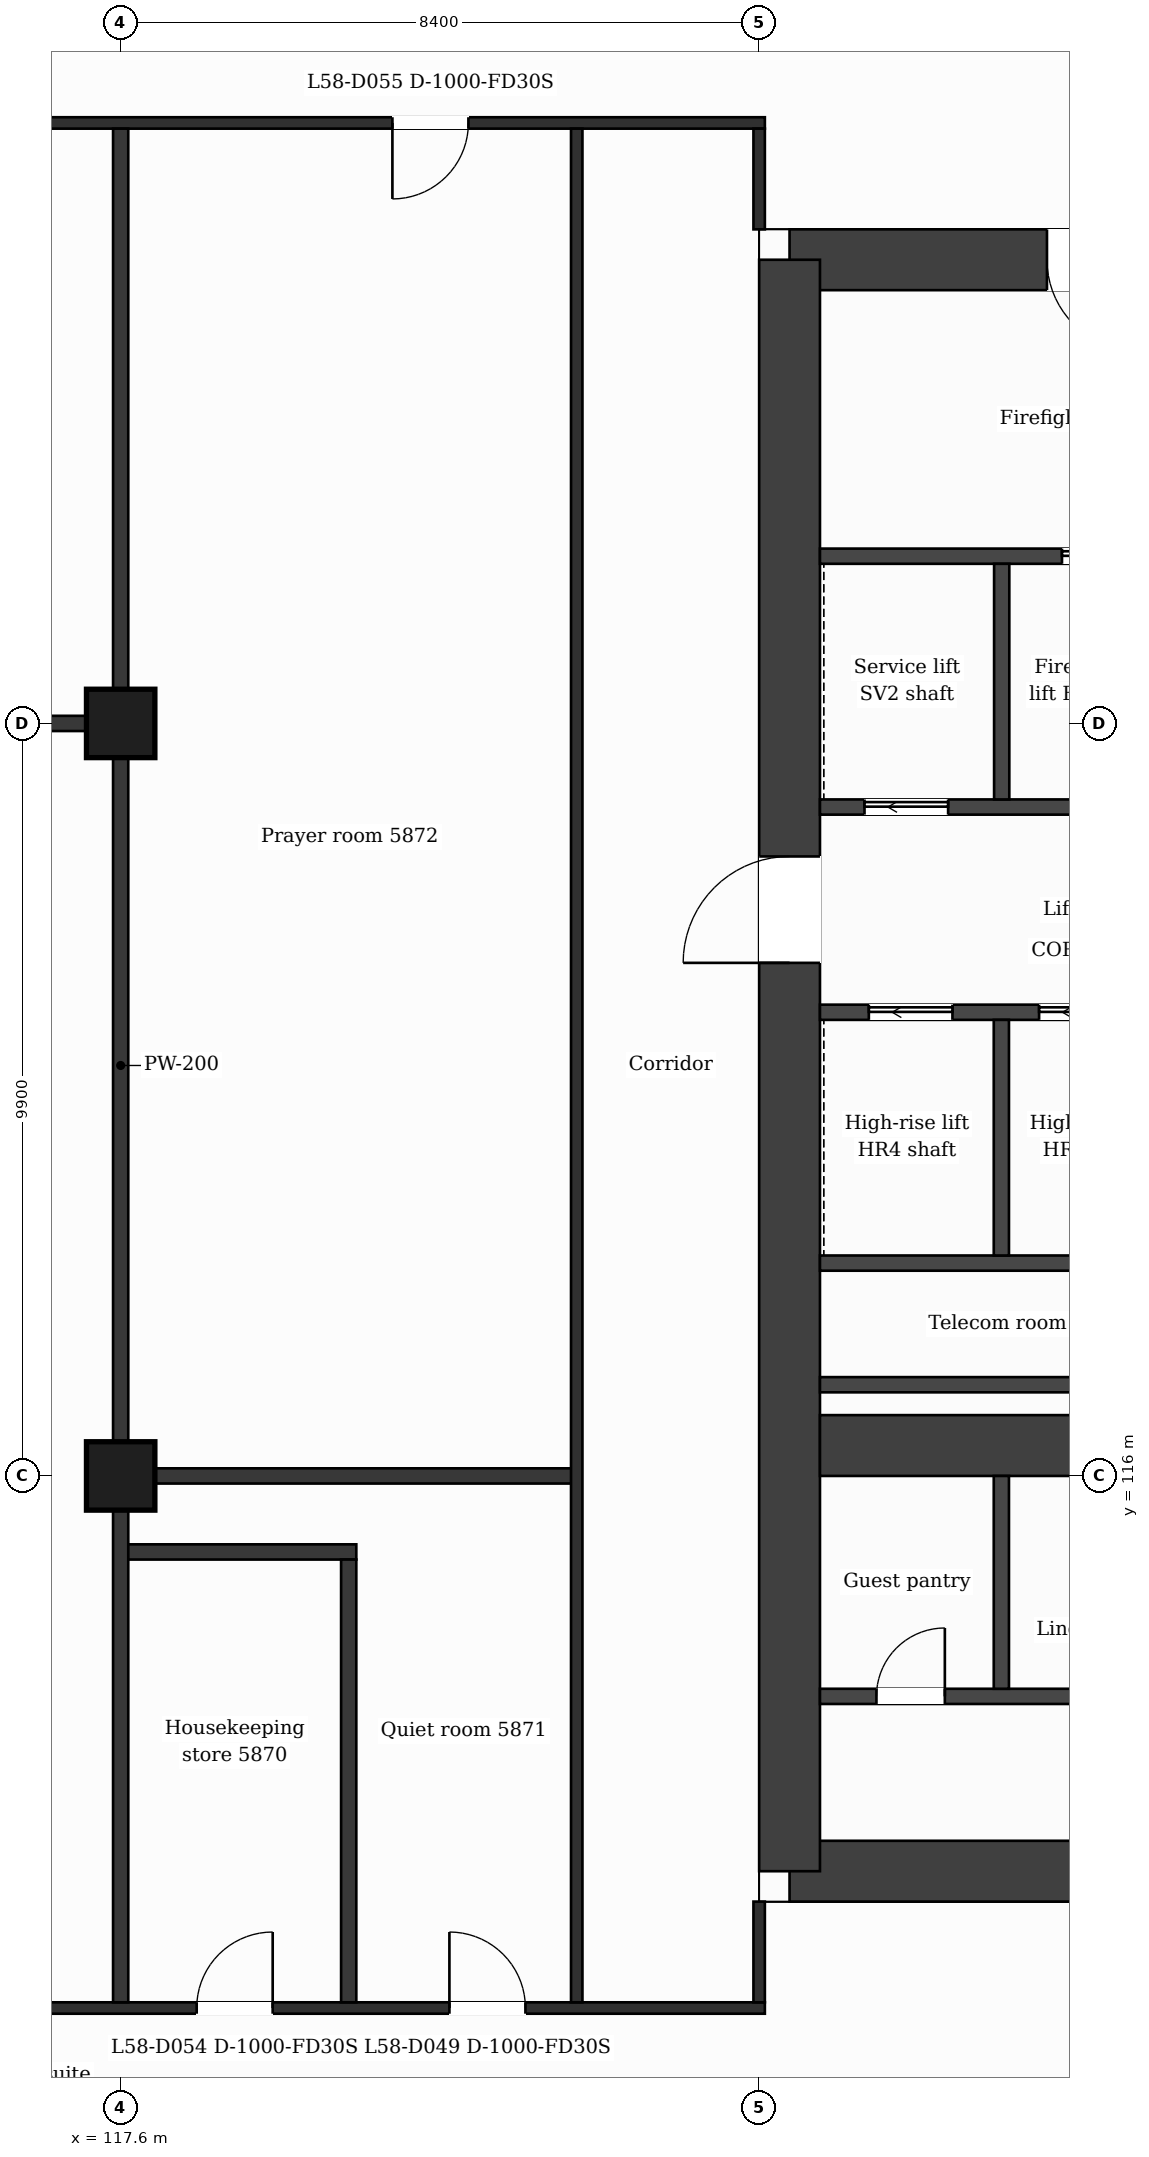
"""IFC4 building model, lengths in metres.
Left out: names, types, materials, properties, quantities, classifications, styles, units other than length and angle.
Written with IfcOpenShell. Run it as: python <this file> out.ifc"""

import sys

from ifc_helpers import new_model, si_unit, direction, frame, frame_2d, origin, origin_2d, place, context, subcontext, project, spatial, rectangle, extrude, element, fill, save


model = new_model("IFC4")
c1 = context("Model", 3, precision=1e-05, world=origin(), true_north=direction((0.0, 1.0)))
c2 = subcontext(c1, "Body", "Model", "MODEL_VIEW")
j1 = project(units=[si_unit("LENGTHUNIT", "METRE"), si_unit("PLANEANGLEUNIT", "RADIAN")], contexts=[c1])
p1 = place(None, origin())
s1 = spatial("IfcSite", under=j1, at=p1, CompositionType="ELEMENT")
p2 = place(p1, origin())
s2 = spatial("IfcBuilding", under=s1, at=p2, CompositionType="ELEMENT")
p3 = place(p2, frame((0.0, 0.0, 239.2)))
s3 = spatial("IfcBuildingStorey", under=s2, at=p3, CompositionType="ELEMENT", Elevation=239.2)
p4 = place(p3, frame((126.4, 132.0, 0.0), z_axis=(0.0, 0.0, 1.0), x_axis=(1.0, 0.0, 0.0)))
e1 = element("IfcWall", 1, at=p4, inside=s3, PredefinedType="SHEAR", context=c2, shape_type="SweptSolid", body=[
    extrude(rectangle(XDim=11.42, YDim=0.8, at=frame_2d((5.71, 0.0))), origin(), (0.0, 0.0, 1.0), 3.7),
])
p5 = place(p4, frame((3.386, 0.0, 0.0)))
e2 = element("IfcOpeningElement", 2, at=p5, cuts=e1, PredefinedType="OPENING", context=c2, shape_type="SweptSolid", body=[
    extrude(rectangle(XDim=1.2, YDim=2.1, at=frame_2d((0.6, 1.05))), frame((0.0, 0.41, 0.0), z_axis=(0.0, -1.0, 0.0), x_axis=(1.0, 0.0, 0.0)), (0.0, 0.0, 1.0), 0.82),
])
p6 = place(p3, frame((140.673, 110.8, 0.0), z_axis=(0.0, 0.0, 1.0), x_axis=(-1.0, 0.0, 0.0)))
e3 = element("IfcWall", 3, at=p6, inside=s3, PredefinedType="SHEAR", context=c2, shape_type="SweptSolid", body=[
    extrude(rectangle(XDim=14.273, YDim=0.8, at=frame_2d((7.137, 0.0))), origin(), (0.0, 0.0, 1.0), 3.7),
])
p7 = place(p6, frame((6.965, 0.0, 0.0)))
e4 = element("IfcOpeningElement", 4, at=p7, cuts=e3, PredefinedType="OPENING", context=c2, shape_type="SweptSolid", body=[
    extrude(rectangle(XDim=1.4, YDim=2.1, at=frame_2d((0.7, 1.05))), frame((0.0, 0.41, 0.0), z_axis=(0.0, -1.0, 0.0), x_axis=(1.0, 0.0, 0.0)), (0.0, 0.0, 1.0), 0.82),
])
p8 = place(p3, frame((126.4, 110.8, 0.0), z_axis=(0.0, 0.0, 1.0), x_axis=(0.0, 1.0, 0.0)))
e5 = element("IfcWall", 5, at=p8, inside=s3, PredefinedType="SHEAR", context=c2, shape_type="SweptSolid", body=[
    extrude(rectangle(XDim=21.2, YDim=0.8, at=frame_2d((10.6, 0.0))), origin(), (0.0, 0.0, 1.0), 3.7),
])
p9 = place(p8, frame((11.95, 0.0, 0.0)))
e6 = element("IfcOpeningElement", 6, at=p9, cuts=e5, PredefinedType="OPENING", context=c2, shape_type="SweptSolid", body=[
    extrude(rectangle(XDim=1.4, YDim=2.1, at=frame_2d((0.7, 1.05))), frame((0.0, 0.41, 0.0), z_axis=(0.0, -1.0, 0.0), x_axis=(1.0, 0.0, 0.0)), (0.0, 0.0, 1.0), 0.82),
])
p10 = place(p3, frame((126.8, 116.4, 0.0), z_axis=(0.0, 0.0, 1.0), x_axis=(1.0, 0.0, 0.0)))
e7 = element("IfcWall", 7, at=p10, inside=s3, PredefinedType="SHEAR", context=c2, shape_type="SweptSolid", body=[
    extrude(rectangle(XDim=5.3, YDim=0.8, at=frame_2d((2.65, 0.0))), origin(), (0.0, 0.0, 1.0), 3.7),
])
for number, where, z_axis, x_axis in (
    (8, (117.6, 116.0, 0.0), (0.0, 0.0, 1.0), (1.0, 0.0, 0.0)),
    (9, (117.6, 125.9, 0.0), (0.0, 0.0, 1.0), (1.0, 0.0, 0.0)),
):
    element("IfcColumn", number, at=place(p3, frame(where, z_axis=z_axis, x_axis=x_axis)), inside=s3, PredefinedType="COLUMN", context=c2, shape_type="SweptSolid", body=[
        extrude(rectangle(XDim=0.9, YDim=0.9, at=origin_2d()), origin(), (0.0, 0.0, 1.0), 3.7),
    ])
p11 = place(p3, frame((100.725, 109.0, 0.0), z_axis=(0.0, 0.0, 1.0), x_axis=(1.0, 0.0, 0.0)))
e10 = element("IfcWall", 10, at=p11, inside=s3, PredefinedType="PARTITIONING", context=c2, shape_type="SweptSolid", body=[
    extrude(rectangle(XDim=25.35, YDim=0.15, at=frame_2d((12.675, 0.0))), origin(), (0.0, 0.0, 1.0), 3.38),
])
p12 = place(p11, frame((21.2, 0.0, 0.0)))
e11 = element("IfcOpeningElement", 11, at=p12, cuts=e10, PredefinedType="OPENING", context=c2, shape_type="SweptSolid", body=[
    extrude(rectangle(XDim=1.0, YDim=2.1, at=frame_2d((0.5, 1.05))), frame((0.0, 0.085, 0.0), z_axis=(0.0, -1.0, 0.0), x_axis=(1.0, 0.0, 0.0)), (0.0, 0.0, 1.0), 0.17),
])
p13 = place(p11, frame((3.9, 0.0, 0.0)))
e12 = element("IfcOpeningElement", 12, at=p13, cuts=e10, PredefinedType="OPENING", context=c2, shape_type="SweptSolid", body=[
    extrude(rectangle(XDim=1.0, YDim=2.1, at=frame_2d((0.5, 1.05))), frame((0.0, 0.085, 0.0), z_axis=(0.0, -1.0, 0.0), x_axis=(1.0, 0.0, 0.0)), (0.0, 0.0, 1.0), 0.17),
])
p14 = place(p11, frame((10.5, 0.0, 0.0)))
e13 = element("IfcOpeningElement", 13, at=p14, cuts=e10, PredefinedType="OPENING", context=c2, shape_type="SweptSolid", body=[
    extrude(rectangle(XDim=1.0, YDim=2.1, at=frame_2d((0.5, 1.05))), frame((0.0, 0.085, 0.0), z_axis=(0.0, -1.0, 0.0), x_axis=(1.0, 0.0, 0.0)), (0.0, 0.0, 1.0), 0.17),
])
p15 = place(p11, frame((17.875, 0.0, 0.0)))
e14 = element("IfcOpeningElement", 14, at=p15, cuts=e10, PredefinedType="OPENING", context=c2, shape_type="SweptSolid", body=[
    extrude(rectangle(XDim=1.0, YDim=2.1, at=frame_2d((0.5, 1.05))), frame((0.0, 0.085, 0.0), z_axis=(0.0, -1.0, 0.0), x_axis=(1.0, 0.0, 0.0)), (0.0, 0.0, 1.0), 0.17),
])
p16 = place(p3, frame((126.8, 113.1, 0.0), z_axis=(0.0, 0.0, 1.0), x_axis=(1.0, 0.0, 0.0)))
e15 = element("IfcWall", 15, at=p16, inside=s3, PredefinedType="PARTITIONING", context=c2, shape_type="SweptSolid", body=[
    extrude(rectangle(XDim=4.873, YDim=0.2, at=frame_2d((2.437, 0.0))), origin(), (0.0, 0.0, 1.0), 3.38),
])
p17 = place(p16, frame((0.743, 0.0, 0.0)))
e16 = element("IfcOpeningElement", 16, at=p17, cuts=e15, PredefinedType="OPENING", context=c2, shape_type="SweptSolid", body=[
    extrude(rectangle(XDim=0.9, YDim=2.1, at=frame_2d((0.45, 1.05))), frame((0.0, 0.11, 0.0), z_axis=(0.0, -1.0, 0.0), x_axis=(1.0, 0.0, 0.0)), (0.0, 0.0, 1.0), 0.22),
])
p18 = place(p3, frame((117.6, 115.0, 0.0), z_axis=(0.0, 0.0, 1.0), x_axis=(1.0, 0.0, 0.0)))
e17 = element("IfcWall", 17, at=p18, inside=s3, PredefinedType="PARTITIONING", context=c2, shape_type="SweptSolid", body=[
    extrude(rectangle(XDim=3.1, YDim=0.2, at=frame_2d((1.55, 0.0))), origin(), (0.0, 0.0, 1.0), 3.38),
])
p19 = place(p3, frame((117.6, 116.0, 0.0), z_axis=(0.0, 0.0, 1.0), x_axis=(1.0, 0.0, 0.0)))
e18 = element("IfcWall", 18, at=p19, inside=s3, PredefinedType="PARTITIONING", context=c2, shape_type="SweptSolid", body=[
    extrude(rectangle(XDim=6.0, YDim=0.2, at=frame_2d((3.0, 0.0))), origin(), (0.0, 0.0, 1.0), 3.38),
])
for number, where, z_axis, x_axis in (
    (19, (126.8, 117.2, 0.0), (0.0, 0.0, 1.0), (1.0, 0.0, 0.0)),
    (20, (126.8, 118.8, 0.0), (0.0, 0.0, 1.0), (1.0, 0.0, 0.0)),
):
    element("IfcWall", number, at=place(p3, frame(where, z_axis=z_axis, x_axis=x_axis)), inside=s3, PredefinedType="PARTITIONING", context=c2, shape_type="SweptSolid", body=[
        extrude(rectangle(XDim=4.773, YDim=0.2, at=frame_2d((2.386, 0.0))), origin(), (0.0, 0.0, 1.0), 3.38),
    ])
p20 = place(p3, frame((126.8, 122.1, 0.0), z_axis=(0.0, 0.0, 1.0), x_axis=(1.0, 0.0, 0.0)))
e21 = element("IfcWall", 21, at=p20, inside=s3, PredefinedType="PARTITIONING", context=c2, shape_type="SweptSolid", body=[
    extrude(rectangle(XDim=4.773, YDim=0.2, at=frame_2d((2.386, 0.0))), origin(), (0.0, 0.0, 1.0), 3.38),
])
p21 = place(p20, frame((2.883, 0.0, 0.0)))
e22 = element("IfcOpeningElement", 22, at=p21, cuts=e21, PredefinedType="OPENING", context=c2, shape_type="SweptSolid", body=[
    extrude(rectangle(XDim=1.1, YDim=2.1, at=frame_2d((0.55, 1.05))), frame((0.0, 0.11, 0.0), z_axis=(0.0, -1.0, 0.0), x_axis=(1.0, 0.0, 0.0)), (0.0, 0.0, 1.0), 0.22),
])
p22 = place(p20, frame((0.643, 0.0, 0.0)))
e23 = element("IfcOpeningElement", 23, at=p22, cuts=e21, PredefinedType="OPENING", context=c2, shape_type="SweptSolid", body=[
    extrude(rectangle(XDim=1.1, YDim=2.1, at=frame_2d((0.55, 1.05))), frame((0.0, 0.11, 0.0), z_axis=(0.0, -1.0, 0.0), x_axis=(1.0, 0.0, 0.0)), (0.0, 0.0, 1.0), 0.22),
])
p23 = place(p3, frame((126.8, 124.8, 0.0), z_axis=(0.0, 0.0, 1.0), x_axis=(1.0, 0.0, 0.0)))
e24 = element("IfcWall", 24, at=p23, inside=s3, PredefinedType="PARTITIONING", context=c2, shape_type="SweptSolid", body=[
    extrude(rectangle(XDim=4.782, YDim=0.2, at=frame_2d((2.391, 0.0))), origin(), (0.0, 0.0, 1.0), 3.38),
])
p24 = place(p23, frame((0.586, 0.0, 0.0)))
e25 = element("IfcOpeningElement", 25, at=p24, cuts=e24, PredefinedType="OPENING", context=c2, shape_type="SweptSolid", body=[
    extrude(rectangle(XDim=1.1, YDim=2.1, at=frame_2d((0.55, 1.05))), frame((0.0, 0.11, 0.0), z_axis=(0.0, -1.0, 0.0), x_axis=(1.0, 0.0, 0.0)), (0.0, 0.0, 1.0), 0.22),
])
p25 = place(p3, frame((103.2, 125.9, 0.0), z_axis=(0.0, 0.0, 1.0), x_axis=(1.0, 0.0, 0.0)))
e26 = element("IfcWall", 26, at=p25, inside=s3, PredefinedType="PARTITIONING", context=c2, shape_type="SweptSolid", body=[
    extrude(rectangle(XDim=14.4, YDim=0.2, at=frame_2d((7.2, 0.0))), origin(), (0.0, 0.0, 1.0), 3.38),
])
p26 = place(p3, frame((126.8, 128.1, 0.0), z_axis=(0.0, 0.0, 1.0), x_axis=(1.0, 0.0, 0.0)))
e27 = element("IfcWall", 27, at=p26, inside=s3, PredefinedType="PARTITIONING", context=c2, shape_type="SweptSolid", body=[
    extrude(rectangle(XDim=4.782, YDim=0.2, at=frame_2d((2.391, 0.0))), origin(), (0.0, 0.0, 1.0), 3.38),
])
p27 = place(p26, frame((3.184, 0.0, 0.0)))
e28 = element("IfcOpeningElement", 28, at=p27, cuts=e27, PredefinedType="OPENING", context=c2, shape_type="SweptSolid", body=[
    extrude(rectangle(XDim=1.1, YDim=2.1, at=frame_2d((0.55, 1.05))), frame((0.0, 0.11, 0.0), z_axis=(0.0, -1.0, 0.0), x_axis=(1.0, 0.0, 0.0)), (0.0, 0.0, 1.0), 0.22),
])
p28 = place(p3, frame((100.725, 133.8, 0.0), z_axis=(0.0, 0.0, 1.0), x_axis=(1.0, 0.0, 0.0)))
e29 = element("IfcWall", 29, at=p28, inside=s3, PredefinedType="PARTITIONING", context=c2, shape_type="SweptSolid", body=[
    extrude(rectangle(XDim=25.35, YDim=0.15, at=frame_2d((12.675, 0.0))), origin(), (0.0, 0.0, 1.0), 3.38),
])
p29 = place(p28, frame((4.975, 0.0, 0.0)))
e30 = element("IfcOpeningElement", 30, at=p29, cuts=e29, PredefinedType="OPENING", context=c2, shape_type="SweptSolid", body=[
    extrude(rectangle(XDim=1.0, YDim=2.1, at=frame_2d((0.5, 1.05))), frame((0.0, 0.085, 0.0), z_axis=(0.0, -1.0, 0.0), x_axis=(1.0, 0.0, 0.0)), (0.0, 0.0, 1.0), 0.17),
])
p30 = place(p28, frame((12.175, 0.0, 0.0)))
e31 = element("IfcOpeningElement", 31, at=p30, cuts=e29, PredefinedType="OPENING", context=c2, shape_type="SweptSolid", body=[
    extrude(rectangle(XDim=1.0, YDim=2.1, at=frame_2d((0.5, 1.05))), frame((0.0, 0.085, 0.0), z_axis=(0.0, -1.0, 0.0), x_axis=(1.0, 0.0, 0.0)), (0.0, 0.0, 1.0), 0.17),
])
p31 = place(p28, frame((20.45, 0.0, 0.0)))
e32 = element("IfcOpeningElement", 32, at=p31, cuts=e29, PredefinedType="OPENING", context=c2, shape_type="SweptSolid", body=[
    extrude(rectangle(XDim=1.0, YDim=2.1, at=frame_2d((0.5, 1.05))), frame((0.0, 0.085, 0.0), z_axis=(0.0, -1.0, 0.0), x_axis=(1.0, 0.0, 0.0)), (0.0, 0.0, 1.0), 0.17),
])
p32 = place(p3, frame((117.6, 109.075, 0.0), z_axis=(0.0, 0.0, 1.0), x_axis=(0.0, 1.0, 0.0)))
e33 = element("IfcWall", 33, at=p32, inside=s3, PredefinedType="PARTITIONING", context=c2, shape_type="SweptSolid", body=[
    extrude(rectangle(XDim=24.65, YDim=0.2, at=frame_2d((12.325, 0.0))), origin(), (0.0, 0.0, 1.0), 3.38),
])
p33 = place(p3, frame((120.6, 109.075, 0.0), z_axis=(0.0, 0.0, 1.0), x_axis=(0.0, 1.0, 0.0)))
e34 = element("IfcWall", 34, at=p33, inside=s3, PredefinedType="PARTITIONING", context=c2, shape_type="SweptSolid", body=[
    extrude(rectangle(XDim=5.825, YDim=0.2, at=frame_2d((2.913, 0.0))), origin(), (0.0, 0.0, 1.0), 3.38),
])
p34 = place(p3, frame((123.6, 109.075, 0.0), z_axis=(0.0, 0.0, 1.0), x_axis=(0.0, 1.0, 0.0)))
e35 = element("IfcWall", 35, at=p34, inside=s3, PredefinedType="PARTITIONING", context=c2, shape_type="SweptSolid", body=[
    extrude(rectangle(XDim=24.65, YDim=0.15, at=frame_2d((12.325, 0.0))), origin(), (0.0, 0.0, 1.0), 3.38),
])
p35 = place(p3, frame((126.0, 109.075, 0.0), z_axis=(0.0, 0.0, 1.0), x_axis=(0.0, 1.0, 0.0)))
e36 = element("IfcWall", 36, at=p35, inside=s3, PredefinedType="PARTITIONING", context=c2, shape_type="SweptSolid", body=[
    extrude(rectangle(XDim=1.325, YDim=0.15, at=frame_2d((0.663, 0.0))), origin(), (0.0, 0.0, 1.0), 3.38),
])
p36 = place(p3, frame((126.0, 132.4, 0.0), z_axis=(0.0, 0.0, 1.0), x_axis=(0.0, 1.0, 0.0)))
e37 = element("IfcWall", 37, at=p36, inside=s3, PredefinedType="PARTITIONING", context=c2, shape_type="SweptSolid", body=[
    extrude(rectangle(XDim=1.325, YDim=0.15, at=frame_2d((0.663, 0.0))), origin(), (0.0, 0.0, 1.0), 3.38),
])
p37 = place(p3, frame((129.187, 113.2, 0.0), z_axis=(0.0, 0.0, 1.0), x_axis=(0.0, 1.0, 0.0)))
e38 = element("IfcWall", 38, at=p37, inside=s3, PredefinedType="PARTITIONING", context=c2, shape_type="SweptSolid", body=[
    extrude(rectangle(XDim=2.8, YDim=0.2, at=frame_2d((1.4, 0.0))), origin(), (0.0, 0.0, 1.0), 3.38),
])
for number, where, z_axis, x_axis in (
    (39, (129.187, 118.9, 0.0), (0.0, 0.0, 1.0), (0.0, 1.0, 0.0)),
    (40, (129.191, 124.9, 0.0), (0.0, 0.0, 1.0), (0.0, 1.0, 0.0)),
):
    element("IfcWall", number, at=place(p3, frame(where, z_axis=z_axis, x_axis=x_axis)), inside=s3, PredefinedType="PARTITIONING", context=c2, shape_type="SweptSolid", body=[
        extrude(rectangle(XDim=3.1, YDim=0.2, at=frame_2d((1.55, 0.0))), origin(), (0.0, 0.0, 1.0), 3.38),
    ])
p38 = place(p21, origin())
e41 = element("IfcDoor", 41, at=p38, inside=s3, OperationType="SLIDING_TO_LEFT", PredefinedType="DOOR", context=c2, shape_type="SweptSolid", body=[
    extrude(rectangle(XDim=1.1, YDim=2.1, at=frame_2d((0.55, 1.05))), frame((0.0, 0.025, 0.0), z_axis=(0.0, -1.0, 0.0), x_axis=(1.0, 0.0, 0.0)), (0.0, 0.0, 1.0), 0.05),
])
fill(e22, e41)
p39 = place(p22, origin())
e42 = element("IfcDoor", 42, at=p39, inside=s3, OperationType="SLIDING_TO_LEFT", PredefinedType="DOOR", context=c2, shape_type="SweptSolid", body=[
    extrude(rectangle(XDim=1.1, YDim=2.1, at=frame_2d((0.55, 1.05))), frame((0.0, 0.025, 0.0), z_axis=(0.0, -1.0, 0.0), x_axis=(1.0, 0.0, 0.0)), (0.0, 0.0, 1.0), 0.05),
])
fill(e23, e42)
p40 = place(p27, origin())
e43 = element("IfcDoor", 43, at=p40, inside=s3, OperationType="SLIDING_TO_LEFT", PredefinedType="DOOR", context=c2, shape_type="SweptSolid", body=[
    extrude(rectangle(XDim=1.1, YDim=2.1, at=frame_2d((0.55, 1.05))), frame((0.0, 0.025, 0.0), z_axis=(0.0, -1.0, 0.0), x_axis=(1.0, 0.0, 0.0)), (0.0, 0.0, 1.0), 0.05),
])
fill(e28, e43)
p41 = place(p24, origin())
e44 = element("IfcDoor", 44, at=p41, inside=s3, OperationType="SLIDING_TO_LEFT", PredefinedType="DOOR", context=c2, shape_type="SweptSolid", body=[
    extrude(rectangle(XDim=1.1, YDim=2.1, at=frame_2d((0.55, 1.05))), frame((0.0, 0.025, 0.0), z_axis=(0.0, -1.0, 0.0), x_axis=(1.0, 0.0, 0.0)), (0.0, 0.0, 1.0), 0.05),
])
fill(e25, e44)
p42 = place(p17, origin())
e45 = element("IfcDoor", 45, at=p42, inside=s3, OperationType="SINGLE_SWING_RIGHT", PredefinedType="DOOR", context=c2, shape_type="SweptSolid", body=[
    extrude(rectangle(XDim=0.9, YDim=2.1, at=frame_2d((0.45, 1.05))), frame((0.0, 0.025, 0.0), z_axis=(0.0, -1.0, 0.0), x_axis=(1.0, 0.0, 0.0)), (0.0, 0.0, 1.0), 0.05),
])
fill(e16, e45)
p43 = place(p12, origin())
e46 = element("IfcDoor", 46, at=p43, inside=s3, OperationType="SINGLE_SWING_LEFT", PredefinedType="DOOR", context=c2, shape_type="SweptSolid", body=[
    extrude(rectangle(XDim=1.0, YDim=2.1, at=frame_2d((0.5, 1.05))), frame((0.0, 0.025, 0.0), z_axis=(0.0, -1.0, 0.0), x_axis=(1.0, 0.0, 0.0)), (0.0, 0.0, 1.0), 0.05),
])
fill(e11, e46)
p44 = place(p15, origin())
e47 = element("IfcDoor", 47, at=p44, inside=s3, OperationType="SINGLE_SWING_RIGHT", PredefinedType="DOOR", context=c2, shape_type="SweptSolid", body=[
    extrude(rectangle(XDim=1.0, YDim=2.1, at=frame_2d((0.5, 1.05))), frame((0.0, 0.025, 0.0), z_axis=(0.0, -1.0, 0.0), x_axis=(1.0, 0.0, 0.0)), (0.0, 0.0, 1.0), 0.05),
])
fill(e14, e47)
p45 = place(p31, origin())
e48 = element("IfcDoor", 48, at=p45, inside=s3, OperationType="SINGLE_SWING_LEFT", PredefinedType="DOOR", context=c2, shape_type="SweptSolid", body=[
    extrude(rectangle(XDim=1.0, YDim=2.1, at=frame_2d((0.5, 1.05))), frame((0.0, 0.025, 0.0), z_axis=(0.0, -1.0, 0.0), x_axis=(1.0, 0.0, 0.0)), (0.0, 0.0, 1.0), 0.05),
])
fill(e32, e48)
p46 = place(p5, origin())
e49 = element("IfcDoor", 49, at=p46, inside=s3, OperationType="SINGLE_SWING_RIGHT", PredefinedType="DOOR", context=c2, shape_type="SweptSolid", body=[
    extrude(rectangle(XDim=1.2, YDim=2.1, at=frame_2d((0.6, 1.05))), frame((0.0, 0.025, 0.0), z_axis=(0.0, -1.0, 0.0), x_axis=(1.0, 0.0, 0.0)), (0.0, 0.0, 1.0), 0.05),
])
fill(e2, e49)
p47 = place(p9, origin())
e50 = element("IfcDoor", 50, at=p47, inside=s3, OperationType="SINGLE_SWING_LEFT", PredefinedType="DOOR", context=c2, shape_type="SweptSolid", body=[
    extrude(rectangle(XDim=1.4, YDim=2.1, at=frame_2d((0.7, 1.05))), frame((0.0, 0.025, 0.0), z_axis=(0.0, -1.0, 0.0), x_axis=(1.0, 0.0, 0.0)), (0.0, 0.0, 1.0), 0.05),
])
fill(e6, e50)
save(model, sys.argv[1])
